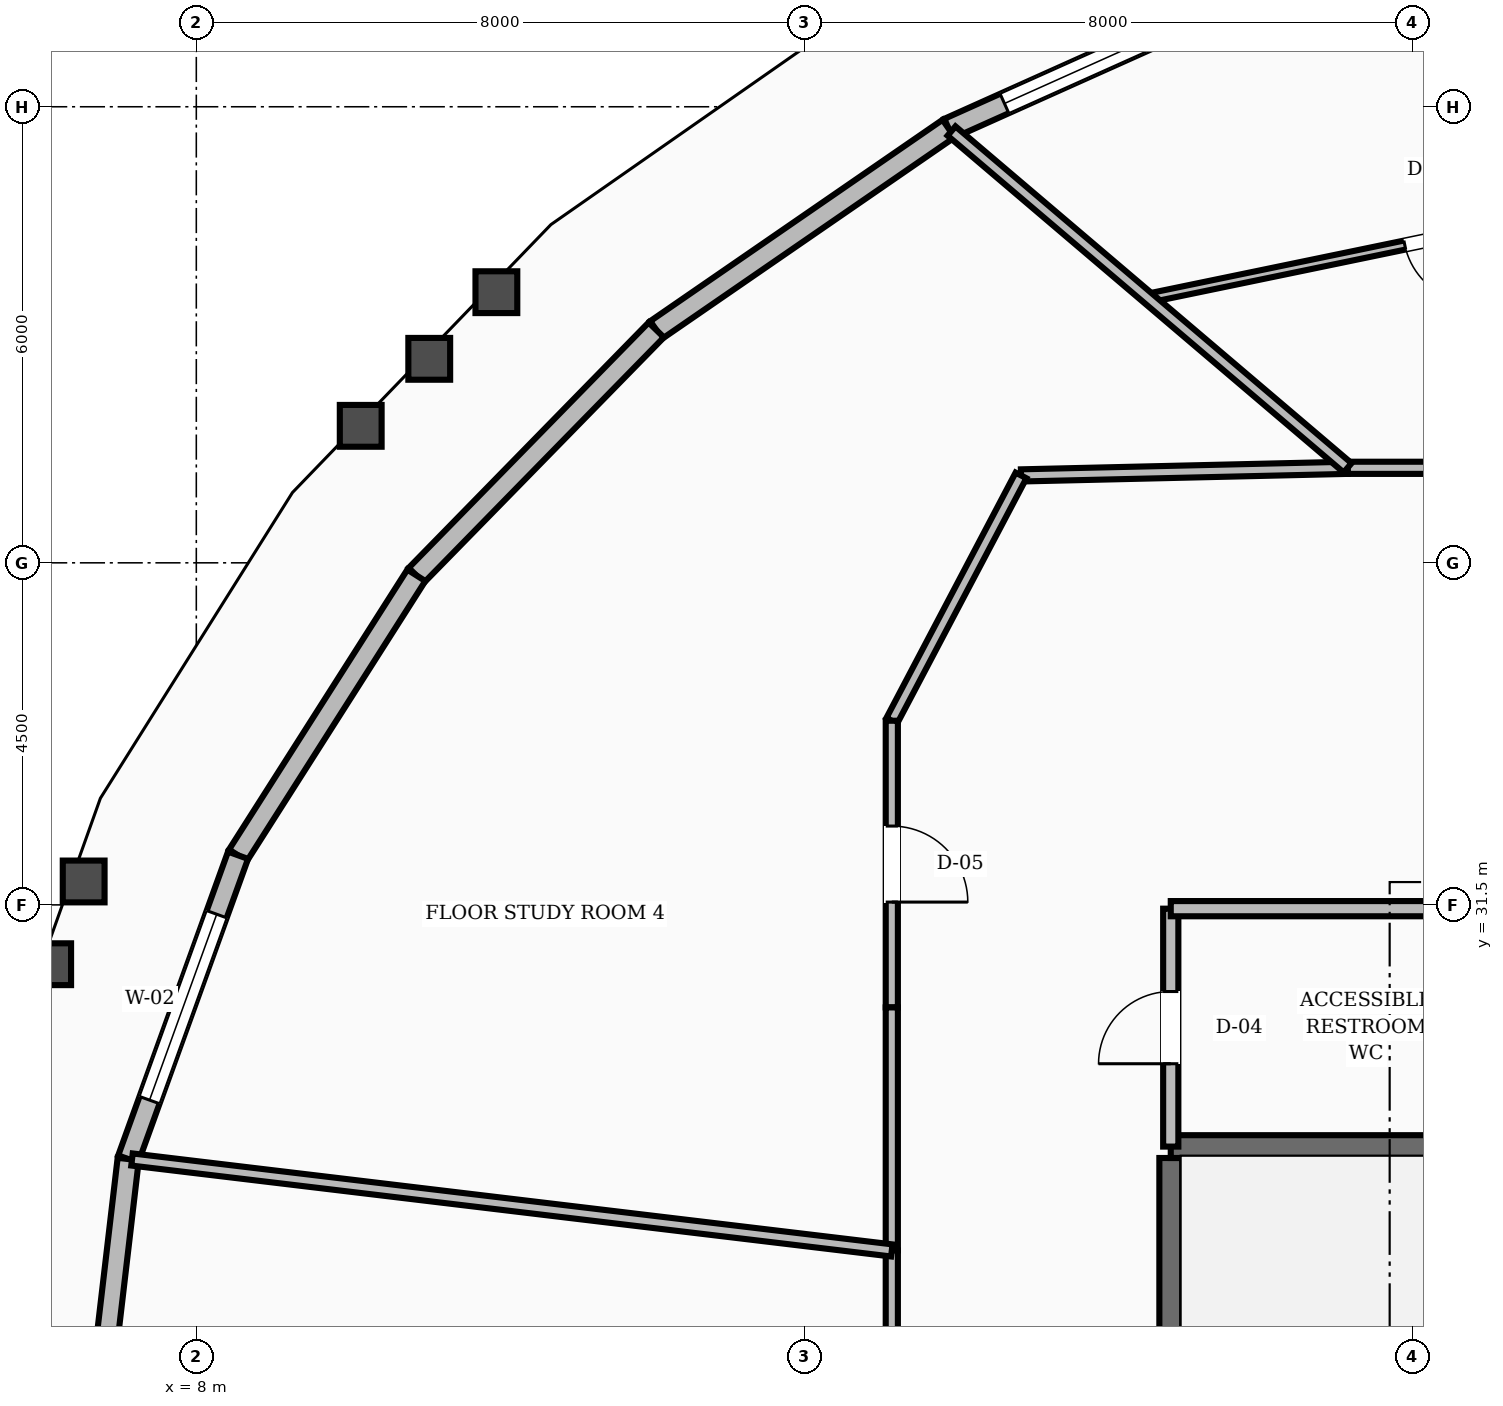
"""IFC4 building model, lengths in metres.
Left out: names, types, materials, properties, quantities, classifications, styles, units other than length and angle.
Written with IfcOpenShell. Run it as: python <this file> out.ifc"""

import sys

from ifc_helpers import new_model, si_unit, direction, frame, frame_2d, origin, place, context, subcontext, project, spatial, rectangle, extrude, element, fill, save


model = new_model("IFC4")
c1 = context("Model", 3, precision=1e-05, world=origin(), true_north=direction((0.0, 1.0)))
c2 = subcontext(c1, "Body", "Model", "MODEL_VIEW")
j1 = project(units=[si_unit("LENGTHUNIT", "METRE"), si_unit("PLANEANGLEUNIT", "RADIAN")], contexts=[c1])
p1 = place(None, origin())
s1 = spatial("IfcSite", under=j1, at=p1, CompositionType="ELEMENT")
p2 = place(p1, origin())
s2 = spatial("IfcBuilding", under=s1, at=p2, CompositionType="ELEMENT")
p3 = place(p2, frame((0.0, 0.0, 185.6)))
s3 = spatial("IfcBuildingStorey", under=s2, at=p3, CompositionType="ELEMENT", Elevation=185.6)
p4 = place(p3, frame((20.82, 19.43, 0.0), z_axis=(0.0, 0.0, 1.0), x_axis=(0.0, 1.0, 0.0)))
e1 = element("IfcWall", 1, at=p4, inside=s3, PredefinedType="SHEAR", context=c2, shape_type="SweptSolid", body=[
    extrude(rectangle(XDim=8.74, YDim=0.3, at=frame_2d((4.37, 0.0))), origin(), (0.0, 0.0, 1.0), 3.6),
])
p5 = place(p3, frame((20.82, 28.32, 0.0), z_axis=(0.0, 0.0, 1.0), x_axis=(1.0, 0.0, 0.0)))
e2 = element("IfcWall", 2, at=p5, inside=s3, PredefinedType="SHEAR", context=c2, shape_type="SweptSolid", body=[
    extrude(rectangle(XDim=3.6, YDim=0.3, at=frame_2d((1.8, 0.0))), origin(), (0.0, 0.0, 1.0), 3.6),
])
p6 = place(p3, frame((22.286, 43.682, 0.0), z_axis=(0.0, 0.0, 1.0), x_axis=(-0.91240998906, -0.409277426525, 0.0)))
e3 = element("IfcWall", 3, at=p6, inside=s3, PredefinedType="STANDARD", context=c2, shape_type="SweptSolid", body=[
    extrude(rectangle(XDim=4.81, YDim=0.28, at=frame_2d((2.405, 0.0))), origin(), (0.0, 0.0, 1.0), 2.82),
])
p7 = place(p6, frame((0.805, 0.0, 0.8)))
e4 = element("IfcOpeningElement", 4, at=p7, cuts=e3, PredefinedType="OPENING", context=c2, shape_type="SweptSolid", body=[
    extrude(rectangle(XDim=3.2, YDim=1.65, at=frame_2d((1.6, 0.825))), frame((0.0, 0.15, 0.0), z_axis=(0.0, -1.0, 0.0), x_axis=(1.0, 0.0, 0.0)), (0.0, 0.0, 1.0), 0.3),
])
p8 = place(p3, frame((17.898, 41.713, 0.0), z_axis=(0.0, 0.0, 1.0), x_axis=(-0.823542873284, -0.567254031157, 0.0)))
e5 = element("IfcWall", 5, at=p8, inside=s3, PredefinedType="STANDARD", context=c2, shape_type="SweptSolid", body=[
    extrude(rectangle(XDim=4.671, YDim=0.28, at=frame_2d((2.335, 0.0))), origin(), (0.0, 0.0, 1.0), 2.82),
])
p9 = place(p3, frame((14.051, 39.064, 0.0), z_axis=(0.0, 0.0, 1.0), x_axis=(-0.699140974596, -0.714983844322, 0.0)))
e6 = element("IfcWall", 6, at=p9, inside=s3, PredefinedType="STANDARD", context=c2, shape_type="SweptSolid", body=[
    extrude(rectangle(XDim=4.515, YDim=0.28, at=frame_2d((2.258, 0.0))), origin(), (0.0, 0.0, 1.0), 2.82),
])
p10 = place(p3, frame((10.895, 35.836, 0.0), z_axis=(0.0, 0.0, 1.0), x_axis=(-0.537186580304, -0.843463441971, 0.0)))
e7 = element("IfcWall", 7, at=p10, inside=s3, PredefinedType="STANDARD", context=c2, shape_type="SweptSolid", body=[
    extrude(rectangle(XDim=4.367, YDim=0.28, at=frame_2d((2.183, 0.0))), origin(), (0.0, 0.0, 1.0), 2.82),
])
p11 = place(p3, frame((8.549, 32.153, 0.0), z_axis=(0.0, 0.0, 1.0), x_axis=(-0.339929618066, -0.940450878442, 0.0)))
e8 = element("IfcWall", 8, at=p11, inside=s3, PredefinedType="STANDARD", context=c2, shape_type="SweptSolid", body=[
    extrude(rectangle(XDim=4.25, YDim=0.28, at=frame_2d((2.125, 0.0))), origin(), (0.0, 0.0, 1.0), 2.82),
])
p12 = place(p11, frame((0.825, 0.0, 0.8)))
e9 = element("IfcOpeningElement", 9, at=p12, cuts=e8, PredefinedType="OPENING", context=c2, shape_type="SweptSolid", body=[
    extrude(rectangle(XDim=2.6, YDim=1.65, at=frame_2d((1.3, 0.825))), frame((0.0, 0.15, 0.0), z_axis=(0.0, -1.0, 0.0), x_axis=(1.0, 0.0, 0.0)), (0.0, 0.0, 1.0), 0.3),
])
p13 = place(p3, frame((7.104, 28.156, 0.0), z_axis=(0.0, 0.0, 1.0), x_axis=(-0.116512882188, -0.993189180511, 0.0)))
e10 = element("IfcWall", 10, at=p13, inside=s3, PredefinedType="STANDARD", context=c2, shape_type="SweptSolid", body=[
    extrude(rectangle(XDim=4.185, YDim=0.28, at=frame_2d((2.092, 0.0))), origin(), (0.0, 0.0, 1.0), 2.82),
])
p14 = place(p3, frame((20.82, 28.32, 0.0), z_axis=(0.0, 0.0, 1.0), x_axis=(0.0, 1.0, 0.0)))
e11 = element("IfcWall", 11, at=p14, inside=s3, PredefinedType="SOLIDWALL", context=c2, shape_type="SweptSolid", body=[
    extrude(rectangle(XDim=3.13, YDim=0.2, at=frame_2d((1.565, 0.0))), origin(), (0.0, 0.0, 1.0), 2.8),
])
p15 = place(p14, frame((1.09, 0.0, 0.0)))
e12 = element("IfcOpeningElement", 12, at=p15, cuts=e11, PredefinedType="OPENING", context=c2, shape_type="SweptSolid", body=[
    extrude(rectangle(XDim=0.95, YDim=2.1, at=frame_2d((0.475, 1.05))), frame((0.0, 0.11, 0.0), z_axis=(0.0, -1.0, 0.0), x_axis=(1.0, 0.0, 0.0)), (0.0, 0.0, 1.0), 0.22),
])
p16 = place(p3, frame((20.82, 31.45, 0.0), z_axis=(0.0, 0.0, 1.0), x_axis=(1.0, 0.0, 0.0)))
e13 = element("IfcWall", 13, at=p16, inside=s3, PredefinedType="SOLIDWALL", context=c2, shape_type="SweptSolid", body=[
    extrude(rectangle(XDim=3.98, YDim=0.2, at=frame_2d((1.99, 0.0))), origin(), (0.0, 0.0, 1.0), 2.8),
])
p17 = place(p3, frame((26.512, 37.25, 0.0), z_axis=(0.0, 0.0, 1.0), x_axis=(-1.0, 0.0, 0.0)))
e14 = element("IfcWall", 14, at=p17, inside=s3, PredefinedType="SOLIDWALL", context=c2, shape_type="SweptSolid", body=[
    extrude(rectangle(XDim=3.365, YDim=0.16, at=frame_2d((1.683, 0.0))), origin(), (0.0, 0.0, 1.0), 2.8),
])
p18 = place(p3, frame((23.146, 37.25, 0.0), z_axis=(0.0, 0.0, 1.0), x_axis=(-0.999728709658, -0.023291781507, 0.0)))
e15 = element("IfcWall", 15, at=p18, inside=s3, PredefinedType="SOLIDWALL", context=c2, shape_type="SweptSolid", body=[
    extrude(rectangle(XDim=4.298, YDim=0.16, at=frame_2d((2.149, 0.0))), origin(), (0.0, 0.0, 1.0), 2.8),
])
p19 = place(p3, frame((18.85, 37.15, 0.0), z_axis=(0.0, 0.0, 1.0), x_axis=(-0.466093963429, -0.884735224378, 0.0)))
e16 = element("IfcWall", 16, at=p19, inside=s3, PredefinedType="SOLIDWALL", context=c2, shape_type="SweptSolid", body=[
    extrude(rectangle(XDim=3.648, YDim=0.16, at=frame_2d((1.824, 0.0))), origin(), (0.0, 0.0, 1.0), 2.8),
])
p20 = place(p3, frame((17.15, 33.923, 0.0), z_axis=(0.0, 0.0, 1.0), x_axis=(0.0, -1.0, 0.0)))
e17 = element("IfcWall", 17, at=p20, inside=s3, PredefinedType="SOLIDWALL", context=c2, shape_type="SweptSolid", body=[
    extrude(rectangle(XDim=3.771, YDim=0.16, at=frame_2d((1.886, 0.0))), origin(), (0.0, 0.0, 1.0), 2.8),
])
p21 = place(p20, frame((1.386, 0.0, 0.0)))
e18 = element("IfcOpeningElement", 18, at=p21, cuts=e17, PredefinedType="OPENING", context=c2, shape_type="SweptSolid", body=[
    extrude(rectangle(XDim=1.0, YDim=2.1, at=frame_2d((0.5, 1.05))), frame((0.0, 0.09, 0.0), z_axis=(0.0, -1.0, 0.0), x_axis=(1.0, 0.0, 0.0)), (0.0, 0.0, 1.0), 0.18),
])
p22 = place(p3, frame((17.15, 30.151, 0.0), z_axis=(0.0, 0.0, 1.0), x_axis=(0.0, -1.0, 0.0)))
e19 = element("IfcWall", 19, at=p22, inside=s3, PredefinedType="SOLIDWALL", context=c2, shape_type="SweptSolid", body=[
    extrude(rectangle(XDim=3.197, YDim=0.16, at=frame_2d((1.599, 0.0))), origin(), (0.0, 0.0, 1.0), 2.8),
])
p23 = place(p3, frame((17.15, 26.954, 0.0), z_axis=(0.0, 0.0, 1.0), x_axis=(0.0, -1.0, 0.0)))
e20 = element("IfcWall", 20, at=p23, inside=s3, PredefinedType="SOLIDWALL", context=c2, shape_type="SweptSolid", body=[
    extrude(rectangle(XDim=2.954, YDim=0.16, at=frame_2d((1.477, 0.0))), origin(), (0.0, 0.0, 1.0), 2.8),
])
p24 = place(p3, frame((28.206, 41.072, 0.0), z_axis=(0.0, 0.0, 1.0), x_axis=(-0.979241044983, -0.202699225013, 0.0)))
e21 = element("IfcWall", 21, at=p24, inside=s3, PredefinedType="PARTITIONING", context=c2, shape_type="SweptSolid", body=[
    extrude(rectangle(XDim=7.847, YDim=0.12, at=frame_2d((3.923, 0.0))), origin(), (0.0, 0.0, 1.0), 2.8),
])
p25 = place(p24, frame((3.448, 0.0, 0.0)))
e22 = element("IfcOpeningElement", 22, at=p25, cuts=e21, PredefinedType="OPENING", context=c2, shape_type="SweptSolid", body=[
    extrude(rectangle(XDim=0.95, YDim=2.1, at=frame_2d((0.475, 1.05))), frame((0.0, 0.07, 0.0), z_axis=(0.0, -1.0, 0.0), x_axis=(1.0, 0.0, 0.0)), (0.0, 0.0, 1.0), 0.14),
])
p26 = place(p3, frame((23.146, 37.25, 0.0), z_axis=(0.0, 0.0, 1.0), x_axis=(-0.761808080293, 0.647802785421, 0.0)))
e23 = element("IfcWall", 23, at=p26, inside=s3, PredefinedType="SOLIDWALL", context=c2, shape_type="SweptSolid", body=[
    extrude(rectangle(XDim=6.84, YDim=0.16, at=frame_2d((3.42, 0.0))), origin(), (0.0, 0.0, 1.0), 2.8),
])
p27 = place(p3, frame((17.15, 26.954, 0.0), z_axis=(0.0, 0.0, 1.0), x_axis=(-0.992914884823, 0.118827738756, 0.0)))
e24 = element("IfcWall", 24, at=p27, inside=s3, PredefinedType="SOLIDWALL", context=c2, shape_type="SweptSolid", body=[
    extrude(rectangle(XDim=10.067, YDim=0.16, at=frame_2d((5.034, 0.0))), origin(), (0.0, 0.0, 1.0), 2.8),
])
p28 = place(p7, origin())
e25 = element("IfcWindow", 25, at=p28, inside=s3, PartitioningType="SINGLE_PANEL", PredefinedType="WINDOW", context=c2, shape_type="SweptSolid", body=[
    extrude(rectangle(XDim=3.2, YDim=1.65, at=frame_2d((1.6, 0.825))), frame((0.0, 0.03, 0.0), z_axis=(0.0, -1.0, 0.0), x_axis=(1.0, 0.0, 0.0)), (0.0, 0.0, 1.0), 0.06),
])
fill(e4, e25)
p29 = place(p12, origin())
e26 = element("IfcWindow", 26, at=p29, inside=s3, PartitioningType="SINGLE_PANEL", PredefinedType="WINDOW", context=c2, shape_type="SweptSolid", body=[
    extrude(rectangle(XDim=2.6, YDim=1.65, at=frame_2d((1.3, 0.825))), frame((0.0, 0.03, 0.0), z_axis=(0.0, -1.0, 0.0), x_axis=(1.0, 0.0, 0.0)), (0.0, 0.0, 1.0), 0.06),
])
fill(e9, e26)
p30 = place(p15, origin())
e27 = element("IfcDoor", 27, at=p30, inside=s3, OperationType="SINGLE_SWING_LEFT", PredefinedType="DOOR", context=c2, shape_type="SweptSolid", body=[
    extrude(rectangle(XDim=0.95, YDim=2.1, at=frame_2d((0.475, 1.05))), frame((0.0, 0.025, 0.0), z_axis=(0.0, -1.0, 0.0), x_axis=(1.0, 0.0, 0.0)), (0.0, 0.0, 1.0), 0.05),
])
fill(e12, e27)
p31 = place(p25, origin())
e28 = element("IfcDoor", 28, at=p31, inside=s3, OperationType="SINGLE_SWING_LEFT", PredefinedType="DOOR", context=c2, shape_type="SweptSolid", body=[
    extrude(rectangle(XDim=0.95, YDim=2.1, at=frame_2d((0.475, 1.05))), frame((0.0, 0.025, 0.0), z_axis=(0.0, -1.0, 0.0), x_axis=(1.0, 0.0, 0.0)), (0.0, 0.0, 1.0), 0.05),
])
fill(e22, e28)
p32 = place(p21, origin())
e29 = element("IfcDoor", 29, at=p32, inside=s3, OperationType="SINGLE_SWING_RIGHT", PredefinedType="DOOR", context=c2, shape_type="SweptSolid", body=[
    extrude(rectangle(XDim=1.0, YDim=2.1, at=frame_2d((0.5, 1.05))), frame((0.0, 0.025, 0.0), z_axis=(0.0, -1.0, 0.0), x_axis=(1.0, 0.0, 0.0)), (0.0, 0.0, 1.0), 0.05),
])
fill(e18, e29)
save(model, sys.argv[1])
